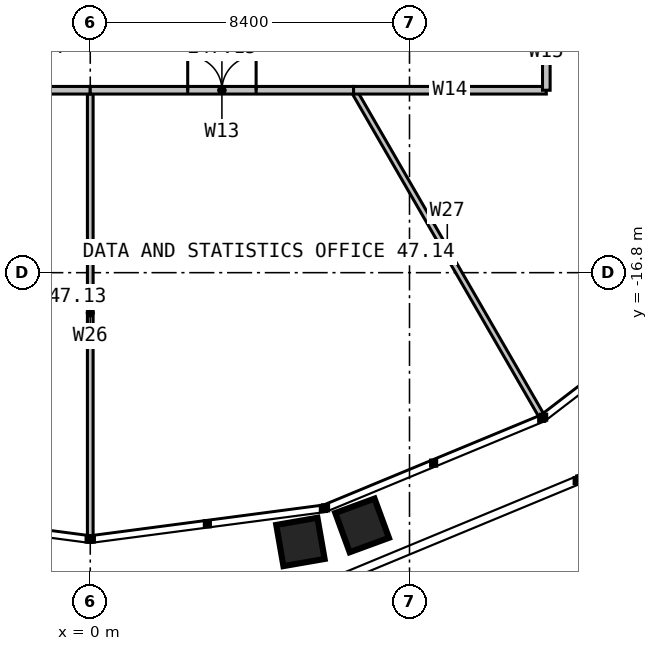
"""IFC4 building model, lengths in metres.
Left out: names, types, materials, properties, quantities, classifications, styles, units other than length and angle.
Written with IfcOpenShell. Run it as: python <this file> out.ifc"""

import sys

from ifc_helpers import new_model, si_unit, direction, frame, frame_2d, origin, place, context, subcontext, project, spatial, rectangle, extrude, element, fill, save


model = new_model("IFC4")
c1 = context("Model", 3, precision=1e-05, world=origin(), true_north=direction((0.0, 1.0)))
c2 = subcontext(c1, "Body", "Model", "MODEL_VIEW")
j1 = project(units=[si_unit("LENGTHUNIT", "METRE"), si_unit("PLANEANGLEUNIT", "RADIAN")], contexts=[c1])
p1 = place(None, origin())
s1 = spatial("IfcSite", under=j1, at=p1, CompositionType="ELEMENT")
p2 = place(p1, origin())
s2 = spatial("IfcBuilding", under=s1, at=p2, CompositionType="ELEMENT")
p3 = place(p2, frame((0.0, 0.0, 195.0)))
s3 = spatial("IfcBuildingStorey", under=s2, at=p3, CompositionType="ELEMENT", Elevation=195.0)
p4 = place(p3, frame((0.0, -12.0, 0.0), z_axis=(0.0, 0.0, 1.0), x_axis=(0.0, -1.0, 0.0)))
e1 = element("IfcWall", 1, at=p4, inside=s3, PredefinedType="PARTITIONING", context=c2, shape_type="SweptSolid", body=[
    extrude(rectangle(XDim=11.721, YDim=0.15, at=frame_2d((5.861, 0.0))), origin(), (0.0, 0.0, 1.0), 2.79),
])
p5 = place(p3, frame((6.928, -12.0, 0.0), z_axis=(0.0, 0.0, 1.0), x_axis=(0.49999595416, -0.866027739639, 0.0)))
e2 = element("IfcWall", 2, at=p5, inside=s3, PredefinedType="PARTITIONING", context=c2, shape_type="SweptSolid", body=[
    extrude(rectangle(XDim=9.865, YDim=0.15, at=frame_2d((4.932, 0.0))), origin(), (0.0, 0.0, 1.0), 2.79),
])
p6 = place(p3, frame((-3.215, -12.0, 0.0), z_axis=(0.0, 0.0, 1.0), x_axis=(1.0, 0.0, 0.0)))
e3 = element("IfcWall", 3, at=p6, inside=s3, PredefinedType="PARTITIONING", context=c2, shape_type="SweptSolid", body=[
    extrude(rectangle(XDim=3.215, YDim=0.2, at=frame_2d((1.608, 0.0))), origin(), (0.0, 0.0, 1.0), 3.8),
])
p7 = place(p6, frame((1.108, 0.0, 0.0)))
e4 = element("IfcOpeningElement", 4, at=p7, cuts=e3, PredefinedType="OPENING", context=c2, shape_type="SweptSolid", body=[
    extrude(rectangle(XDim=1.0, YDim=2.2, at=frame_2d((0.5, 1.1))), frame((0.0, 0.11, 0.0), z_axis=(0.0, -1.0, 0.0), x_axis=(1.0, 0.0, 0.0)), (0.0, 0.0, 1.0), 0.22),
])
p8 = place(p3, frame((0.0, -12.0, 0.0), z_axis=(0.0, 0.0, 1.0), x_axis=(1.0, 0.0, 0.0)))
e5 = element("IfcWall", 5, at=p8, inside=s3, PredefinedType="PARTITIONING", context=c2, shape_type="SweptSolid", body=[
    extrude(rectangle(XDim=6.928, YDim=0.2, at=frame_2d((3.464, 0.0))), origin(), (0.0, 0.0, 1.0), 3.8),
])
p9 = place(p8, frame((2.564, 0.0, 0.0)))
e6 = element("IfcOpeningElement", 6, at=p9, cuts=e5, PredefinedType="OPENING", context=c2, shape_type="SweptSolid", body=[
    extrude(rectangle(XDim=1.8, YDim=2.2, at=frame_2d((0.9, 1.1))), frame((0.0, 0.11, 0.0), z_axis=(0.0, -1.0, 0.0), x_axis=(1.0, 0.0, 0.0)), (0.0, 0.0, 1.0), 0.22),
])
p10 = place(p3, frame((6.928, -12.0, 0.0), z_axis=(0.0, 0.0, 1.0), x_axis=(1.0, 0.0, 0.0)))
e7 = element("IfcWall", 7, at=p10, inside=s3, PredefinedType="PARTITIONING", context=c2, shape_type="SweptSolid", body=[
    extrude(rectangle(XDim=5.072, YDim=0.2, at=frame_2d((2.536, 0.0))), origin(), (0.0, 0.0, 1.0), 3.8),
])
p11 = place(p3, frame((12.0, -12.0, 0.0), z_axis=(0.0, 0.0, 1.0), x_axis=(0.0, 1.0, 0.0)))
e8 = element("IfcWall", 8, at=p11, inside=s3, PredefinedType="PARTITIONING", context=c2, shape_type="SweptSolid", body=[
    extrude(rectangle(XDim=2.0, YDim=0.2, at=frame_2d((1.0, 0.0))), origin(), (0.0, 0.0, 1.0), 3.8),
])
p12 = place(p9, origin())
e9 = element("IfcDoor", 9, at=p12, inside=s3, OperationType="DOUBLE_DOOR_SINGLE_SWING", PredefinedType="DOOR", context=c2, shape_type="SweptSolid", body=[
    extrude(rectangle(XDim=1.8, YDim=2.2, at=frame_2d((0.9, 1.1))), frame((0.0, 0.025, 0.0), z_axis=(0.0, -1.0, 0.0), x_axis=(1.0, 0.0, 0.0)), (0.0, 0.0, 1.0), 0.05),
])
fill(e6, e9)
save(model, sys.argv[1])
